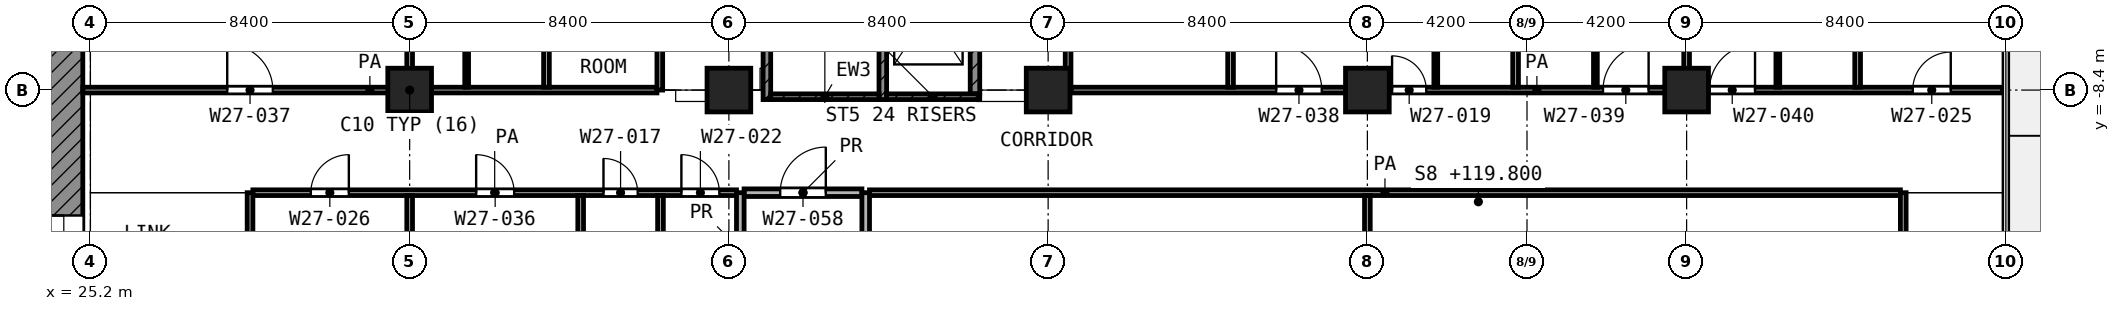
"""IFC4 building model, lengths in metres.
Left out: names, types, materials, properties, quantities, classifications, styles, units other than length and angle.
Written with IfcOpenShell. Run it as: python <this file> out.ifc"""

import sys

from ifc_helpers import new_model, si_unit, direction, frame, frame_2d, origin, origin_2d, place, context, subcontext, project, spatial, rectangle, extrude, element, fill, save


model = new_model("IFC4")
c1 = context("Model", 3, precision=1e-05, world=origin(), true_north=direction((0.0, 1.0)))
c2 = subcontext(c1, "Body", "Model", "MODEL_VIEW")
j1 = project(units=[si_unit("LENGTHUNIT", "METRE"), si_unit("PLANEANGLEUNIT", "RADIAN")], contexts=[c1])
p1 = place(None, origin())
s1 = spatial("IfcSite", under=j1, at=p1, CompositionType="ELEMENT")
p2 = place(p1, origin())
s2 = spatial("IfcBuilding", under=s1, at=p2, CompositionType="ELEMENT")
p3 = place(p2, frame((0.0, 0.0, 119.8)))
s3 = spatial("IfcBuildingStorey", under=s2, at=p3, CompositionType="ELEMENT", Elevation=119.8)
for number, where, z_axis, x_axis in (
    (1, (33.6, -8.4, 0.0), (0.0, 0.0, 1.0), (1.0, 0.0, 0.0)),
    (2, (42.0, -8.4, 0.0), (0.0, 0.0, 1.0), (1.0, 0.0, 0.0)),
    (3, (50.4, -8.4, 0.0), (0.0, 0.0, 1.0), (1.0, 0.0, 0.0)),
    (4, (58.8, -8.4, 0.0), (0.0, 0.0, 1.0), (1.0, 0.0, 0.0)),
    (5, (67.2, -8.4, 0.0), (0.0, 0.0, 1.0), (1.0, 0.0, 0.0)),
):
    element("IfcColumn", number, at=place(p3, frame(where, z_axis=z_axis, x_axis=x_axis)), inside=s3, PredefinedType="COLUMN", context=c2, shape_type="SweptSolid", body=[
        extrude(rectangle(XDim=1.15, YDim=1.15, at=origin_2d()), origin(), (0.0, 0.0, 1.0), 4.2),
    ])
p4 = place(p3, frame((24.5, -24.0, 0.0), z_axis=(0.0, 0.0, 1.0), x_axis=(0.0, 1.0, 0.0)))
e6 = element("IfcWall", 6, at=p4, inside=s3, PredefinedType="SHEAR", context=c2, shape_type="SweptSolid", body=[
    extrude(rectangle(XDim=18.6, YDim=1.0, at=frame_2d((9.3, 0.0))), origin(), (0.0, 0.0, 1.0), 3.6),
])
p5 = place(p4, frame((10.5, 0.0, 0.0)))
e7 = element("IfcOpeningElement", 7, at=p5, cuts=e6, PredefinedType="OPENING", context=c2, shape_type="SweptSolid", body=[
    extrude(rectangle(XDim=1.8, YDim=2.1, at=frame_2d((0.9, 1.05))), frame((0.0, 0.51, 0.0), z_axis=(0.0, -1.0, 0.0), x_axis=(1.0, 0.0, 0.0)), (0.0, 0.0, 1.0), 1.02),
])
p6 = place(p3, frame((43.0, -8.65, 0.0), z_axis=(0.0, 0.0, 1.0), x_axis=(0.0, 1.0, 0.0)))
e8 = element("IfcWall", 8, at=p6, inside=s3, PredefinedType="SHEAR", context=c2, shape_type="SweptSolid", body=[
    extrude(rectangle(XDim=8.35, YDim=0.2, at=frame_2d((4.175, 0.0))), origin(), (0.0, 0.0, 1.0), 3.6),
])
p7 = place(p6, frame((7.0, 0.0, 0.0)))
e9 = element("IfcOpeningElement", 9, at=p7, cuts=e8, PredefinedType="OPENING", context=c2, shape_type="SweptSolid", body=[
    extrude(rectangle(XDim=1.1, YDim=2.1, at=frame_2d((0.55, 1.05))), frame((0.0, 0.11, 0.0), z_axis=(0.0, -1.0, 0.0), x_axis=(1.0, 0.0, 0.0)), (0.0, 0.0, 1.0), 0.22),
])
p8 = place(p3, frame((46.05, -8.65, 0.0), z_axis=(0.0, 0.0, 1.0), x_axis=(0.0, 1.0, 0.0)))
e10 = element("IfcWall", 10, at=p8, inside=s3, PredefinedType="SHEAR", context=c2, shape_type="SweptSolid", body=[
    extrude(rectangle(XDim=8.35, YDim=0.2, at=frame_2d((4.175, 0.0))), origin(), (0.0, 0.0, 1.0), 3.6),
])
p9 = place(p8, frame((7.0, 0.0, 0.0)))
e11 = element("IfcOpeningElement", 11, at=p9, cuts=e10, PredefinedType="OPENING", context=c2, shape_type="SweptSolid", body=[
    extrude(rectangle(XDim=1.1, YDim=2.1, at=frame_2d((0.55, 1.05))), frame((0.0, 0.11, 0.0), z_axis=(0.0, -1.0, 0.0), x_axis=(1.0, 0.0, 0.0)), (0.0, 0.0, 1.0), 0.22),
])
p10 = place(p3, frame((43.1, -8.575, 0.0), z_axis=(0.0, 0.0, 1.0), x_axis=(1.0, 0.0, 0.0)))
e12 = element("IfcWall", 12, at=p10, inside=s3, PredefinedType="SHEAR", context=c2, shape_type="SweptSolid", body=[
    extrude(rectangle(XDim=2.85, YDim=0.15, at=frame_2d((1.425, 0.0))), origin(), (0.0, 0.0, 1.0), 3.6),
])
p11 = place(p3, frame((46.15, -8.575, 0.0), z_axis=(0.0, 0.0, 1.0), x_axis=(1.0, 0.0, 0.0)))
e13 = element("IfcWall", 13, at=p11, inside=s3, PredefinedType="SHEAR", context=c2, shape_type="SweptSolid", body=[
    extrude(rectangle(XDim=2.45, YDim=0.15, at=frame_2d((1.225, 0.0))), origin(), (0.0, 0.0, 1.0), 3.6),
])
p12 = place(p3, frame((48.475, -8.5, 0.0), z_axis=(0.0, 0.0, 1.0), x_axis=(0.0, 1.0, 0.0)))
e14 = element("IfcWall", 14, at=p12, inside=s3, PredefinedType="SHEAR", context=c2, shape_type="SweptSolid", body=[
    extrude(rectangle(XDim=3.475, YDim=0.25, at=frame_2d((1.738, 0.0))), origin(), (0.0, 0.0, 1.0), 3.6),
])
p13 = place(p3, frame((35.1, -8.325, 0.0), z_axis=(0.0, 0.0, 1.0), x_axis=(0.0, 1.0, 0.0)))
e15 = element("IfcWall", 15, at=p13, inside=s3, PredefinedType="PARTITIONING", context=c2, shape_type="SweptSolid", body=[
    extrude(rectangle(XDim=2.623, YDim=0.1, at=frame_2d((1.312, 0.0))), origin(), (0.0, 0.0, 1.0), 3.6),
])
p14 = place(p3, frame((60.6, -8.325, 0.0), z_axis=(0.0, 0.0, 1.0), x_axis=(0.0, 1.0, 0.0)))
e16 = element("IfcWall", 16, at=p14, inside=s3, PredefinedType="PARTITIONING", context=c2, shape_type="SweptSolid", body=[
    extrude(rectangle(XDim=2.624, YDim=0.1, at=frame_2d((1.312, 0.0))), origin(), (0.0, 0.0, 1.0), 3.6),
])
for number, where, z_axis, x_axis in (
    (17, (64.8, -8.325, 0.0), (0.0, 0.0, 1.0), (0.0, 1.0, 0.0)),
    (18, (69.6, -8.325, 0.0), (0.0, 0.0, 1.0), (0.0, 1.0, 0.0)),
):
    element("IfcWall", number, at=place(p3, frame(where, z_axis=z_axis, x_axis=x_axis)), inside=s3, PredefinedType="PARTITIONING", context=c2, shape_type="SweptSolid", body=[
        extrude(rectangle(XDim=2.625, YDim=0.1, at=frame_2d((1.312, 0.0))), origin(), (0.0, 0.0, 1.0), 3.6),
    ])
p15 = place(p3, frame((29.475, -11.1, 0.0), z_axis=(0.0, 0.0, 1.0), x_axis=(1.0, 0.0, 0.0)))
e19 = element("IfcWall", 19, at=p15, inside=s3, PredefinedType="PARTITIONING", context=c2, shape_type="SweptSolid", body=[
    extrude(rectangle(XDim=12.725, YDim=0.15, at=frame_2d((6.362, 0.0))), origin(), (0.0, 0.0, 1.0), 3.6),
])
p16 = place(p15, frame((1.525, 0.0, 0.0)))
e20 = element("IfcOpeningElement", 20, at=p16, cuts=e19, PredefinedType="OPENING", context=c2, shape_type="SweptSolid", body=[
    extrude(rectangle(XDim=1.0, YDim=2.1, at=frame_2d((0.5, 1.05))), frame((0.0, 0.085, 0.0), z_axis=(0.0, -1.0, 0.0), x_axis=(1.0, 0.0, 0.0)), (0.0, 0.0, 1.0), 0.17),
])
p17 = place(p15, frame((9.225, 0.0, 0.0)))
e21 = element("IfcOpeningElement", 21, at=p17, cuts=e19, PredefinedType="OPENING", context=c2, shape_type="SweptSolid", body=[
    extrude(rectangle(XDim=0.9, YDim=2.1, at=frame_2d((0.45, 1.05))), frame((0.0, 0.085, 0.0), z_axis=(0.0, -1.0, 0.0), x_axis=(1.0, 0.0, 0.0)), (0.0, 0.0, 1.0), 0.17),
])
p18 = place(p15, frame((11.275, 0.0, 0.0)))
e22 = element("IfcOpeningElement", 22, at=p18, cuts=e19, PredefinedType="OPENING", context=c2, shape_type="SweptSolid", body=[
    extrude(rectangle(XDim=1.0, YDim=2.1, at=frame_2d((0.5, 1.05))), frame((0.0, 0.085, 0.0), z_axis=(0.0, -1.0, 0.0), x_axis=(1.0, 0.0, 0.0)), (0.0, 0.0, 1.0), 0.17),
])
p19 = place(p15, frame((5.875, 0.0, 0.0)))
e23 = element("IfcOpeningElement", 23, at=p19, cuts=e19, PredefinedType="OPENING", context=c2, shape_type="SweptSolid", body=[
    extrude(rectangle(XDim=1.0, YDim=2.1, at=frame_2d((0.5, 1.05))), frame((0.0, 0.085, 0.0), z_axis=(0.0, -1.0, 0.0), x_axis=(1.0, 0.0, 0.0)), (0.0, 0.0, 1.0), 0.17),
])
p20 = place(p3, frame((45.7, -11.1, 0.0), z_axis=(0.0, 0.0, 1.0), x_axis=(1.0, 0.0, 0.0)))
e24 = element("IfcWall", 24, at=p20, inside=s3, PredefinedType="PARTITIONING", context=c2, shape_type="SweptSolid", body=[
    extrude(rectangle(XDim=27.125, YDim=0.15, at=frame_2d((13.562, 0.0))), origin(), (0.0, 0.0, 1.0), 3.6),
])
p21 = place(p3, frame((25.0, -8.4, 0.0), z_axis=(0.0, 0.0, 1.0), x_axis=(1.0, 0.0, 0.0)))
e25 = element("IfcWall", 25, at=p21, inside=s3, PredefinedType="PARTITIONING", context=c2, shape_type="SweptSolid", body=[
    extrude(rectangle(XDim=15.107, YDim=0.15, at=frame_2d((7.553, 0.0))), origin(), (0.0, 0.0, 1.0), 3.6),
])
p22 = place(p21, frame((3.8, 0.0, 0.0)))
e26 = element("IfcOpeningElement", 26, at=p22, cuts=e25, PredefinedType="OPENING", context=c2, shape_type="SweptSolid", body=[
    extrude(rectangle(XDim=1.2, YDim=2.1, at=frame_2d((0.6, 1.05))), frame((0.0, 0.085, 0.0), z_axis=(0.0, -1.0, 0.0), x_axis=(1.0, 0.0, 0.0)), (0.0, 0.0, 1.0), 0.17),
])
p23 = place(p3, frame((51.0, -8.4, 0.0), z_axis=(0.0, 0.0, 1.0), x_axis=(1.0, 0.0, 0.0)))
e27 = element("IfcWall", 27, at=p23, inside=s3, PredefinedType="PARTITIONING", context=c2, shape_type="SweptSolid", body=[
    extrude(rectangle(XDim=24.52, YDim=0.15, at=frame_2d((12.26, 0.0))), origin(), (0.0, 0.0, 1.0), 3.6),
])
p24 = place(p23, frame((5.4, 0.0, 0.0)))
e28 = element("IfcOpeningElement", 28, at=p24, cuts=e27, PredefinedType="OPENING", context=c2, shape_type="SweptSolid", body=[
    extrude(rectangle(XDim=1.2, YDim=2.1, at=frame_2d((0.6, 1.05))), frame((0.0, 0.085, 0.0), z_axis=(0.0, -1.0, 0.0), x_axis=(1.0, 0.0, 0.0)), (0.0, 0.0, 1.0), 0.17),
])
p25 = place(p23, frame((8.45, 0.0, 0.0)))
e29 = element("IfcOpeningElement", 29, at=p25, cuts=e27, PredefinedType="OPENING", context=c2, shape_type="SweptSolid", body=[
    extrude(rectangle(XDim=0.9, YDim=2.1, at=frame_2d((0.45, 1.05))), frame((0.0, 0.085, 0.0), z_axis=(0.0, -1.0, 0.0), x_axis=(1.0, 0.0, 0.0)), (0.0, 0.0, 1.0), 0.17),
])
p26 = place(p23, frame((14.0, 0.0, 0.0)))
e30 = element("IfcOpeningElement", 30, at=p26, cuts=e27, PredefinedType="OPENING", context=c2, shape_type="SweptSolid", body=[
    extrude(rectangle(XDim=1.2, YDim=2.1, at=frame_2d((0.6, 1.05))), frame((0.0, 0.085, 0.0), z_axis=(0.0, -1.0, 0.0), x_axis=(1.0, 0.0, 0.0)), (0.0, 0.0, 1.0), 0.17),
])
p27 = place(p23, frame((16.8, 0.0, 0.0)))
e31 = element("IfcOpeningElement", 31, at=p27, cuts=e27, PredefinedType="OPENING", context=c2, shape_type="SweptSolid", body=[
    extrude(rectangle(XDim=1.2, YDim=2.1, at=frame_2d((0.6, 1.05))), frame((0.0, 0.085, 0.0), z_axis=(0.0, -1.0, 0.0), x_axis=(1.0, 0.0, 0.0)), (0.0, 0.0, 1.0), 0.17),
])
p28 = place(p23, frame((22.15, 0.0, 0.0)))
e32 = element("IfcOpeningElement", 32, at=p28, cuts=e27, PredefinedType="OPENING", context=c2, shape_type="SweptSolid", body=[
    extrude(rectangle(XDim=1.0, YDim=2.1, at=frame_2d((0.5, 1.05))), frame((0.0, 0.085, 0.0), z_axis=(0.0, -1.0, 0.0), x_axis=(1.0, 0.0, 0.0)), (0.0, 0.0, 1.0), 0.17),
])
p29 = place(p3, frame((29.4, -14.1, 0.0), z_axis=(0.0, 0.0, 1.0), x_axis=(0.0, 1.0, 0.0)))
e33 = element("IfcWall", 33, at=p29, inside=s3, PredefinedType="PARTITIONING", context=c2, shape_type="SweptSolid", body=[
    extrude(rectangle(XDim=3.0, YDim=0.15, at=frame_2d((1.5, 0.0))), origin(), (0.0, 0.0, 1.0), 3.6),
])
p30 = place(p3, frame((33.6, -14.025, 0.0), z_axis=(0.0, 0.0, 1.0), x_axis=(0.0, 1.0, 0.0)))
e34 = element("IfcWall", 34, at=p30, inside=s3, PredefinedType="PARTITIONING", context=c2, shape_type="SweptSolid", body=[
    extrude(rectangle(XDim=2.85, YDim=0.15, at=frame_2d((1.425, 0.0))), origin(), (0.0, 0.0, 1.0), 3.6),
])
for number, where, z_axis, x_axis in (
    (35, (33.6, -8.325, 0.0), (0.0, 0.0, 1.0), (0.0, 1.0, 0.0)),
    (36, (37.2, -8.325, 0.0), (0.0, 0.0, 1.0), (0.0, 1.0, 0.0)),
):
    element("IfcWall", number, at=place(p3, frame(where, z_axis=z_axis, x_axis=x_axis)), inside=s3, PredefinedType="PARTITIONING", context=c2, shape_type="SweptSolid", body=[
        extrude(rectangle(XDim=8.322, YDim=0.15, at=frame_2d((4.161, 0.0))), origin(), (0.0, 0.0, 1.0), 3.6),
    ])
p31 = place(p3, frame((38.1, -14.025, 0.0), z_axis=(0.0, 0.0, 1.0), x_axis=(0.0, 1.0, 0.0)))
e37 = element("IfcWall", 37, at=p31, inside=s3, PredefinedType="PARTITIONING", context=c2, shape_type="SweptSolid", body=[
    extrude(rectangle(XDim=2.85, YDim=0.15, at=frame_2d((1.425, 0.0))), origin(), (0.0, 0.0, 1.0), 3.6),
])
p32 = place(p3, frame((40.182, -8.4, 0.0), z_axis=(0.0, 0.0, 1.0), x_axis=(0.0, 1.0, 0.0)))
e38 = element("IfcWall", 38, at=p32, inside=s3, PredefinedType="PARTITIONING", context=c2, shape_type="SweptSolid", body=[
    extrude(rectangle(XDim=8.05, YDim=0.15, at=frame_2d((4.025, 0.0))), origin(), (0.0, 0.0, 1.0), 3.6),
])
p33 = place(p32, frame((3.525, 0.0, 0.0)))
e39 = element("IfcOpeningElement", 39, at=p33, cuts=e38, PredefinedType="OPENING", context=c2, shape_type="SweptSolid", body=[
    extrude(rectangle(XDim=1.0, YDim=2.1, at=frame_2d((0.5, 1.05))), frame((0.0, 0.085, 0.0), z_axis=(0.0, -1.0, 0.0), x_axis=(1.0, 0.0, 0.0)), (0.0, 0.0, 1.0), 0.17),
])
p34 = place(p3, frame((40.2, -14.025, 0.0), z_axis=(0.0, 0.0, 1.0), x_axis=(0.0, 1.0, 0.0)))
e40 = element("IfcWall", 40, at=p34, inside=s3, PredefinedType="PARTITIONING", context=c2, shape_type="SweptSolid", body=[
    extrude(rectangle(XDim=2.85, YDim=0.15, at=frame_2d((1.425, 0.0))), origin(), (0.0, 0.0, 1.0), 3.6),
])
p35 = place(p3, frame((50.925, -8.4, 0.0), z_axis=(0.0, 0.0, 1.0), x_axis=(0.0, 1.0, 0.0)))
e41 = element("IfcWall", 41, at=p35, inside=s3, PredefinedType="PARTITIONING", context=c2, shape_type="SweptSolid", body=[
    extrude(rectangle(XDim=6.548, YDim=0.15, at=frame_2d((3.274, 0.0))), origin(), (0.0, 0.0, 1.0), 3.6),
])
p36 = place(p35, frame((2.774, 0.0, 0.0)))
e42 = element("IfcOpeningElement", 42, at=p36, cuts=e41, PredefinedType="OPENING", context=c2, shape_type="SweptSolid", body=[
    extrude(rectangle(XDim=1.0, YDim=2.1, at=frame_2d((0.5, 1.05))), frame((0.0, 0.085, 0.0), z_axis=(0.0, -1.0, 0.0), x_axis=(1.0, 0.0, 0.0)), (0.0, 0.0, 1.0), 0.17),
])
p37 = place(p3, frame((55.2, -8.325, 0.0), z_axis=(0.0, 0.0, 1.0), x_axis=(0.0, 1.0, 0.0)))
e43 = element("IfcWall", 43, at=p37, inside=s3, PredefinedType="PARTITIONING", context=c2, shape_type="SweptSolid", body=[
    extrude(rectangle(XDim=8.321, YDim=0.15, at=frame_2d((4.161, 0.0))), origin(), (0.0, 0.0, 1.0), 3.6),
])
p38 = place(p3, frame((58.8, -14.025, 0.0), z_axis=(0.0, 0.0, 1.0), x_axis=(0.0, 1.0, 0.0)))
e44 = element("IfcWall", 44, at=p38, inside=s3, PredefinedType="PARTITIONING", context=c2, shape_type="SweptSolid", body=[
    extrude(rectangle(XDim=2.85, YDim=0.15, at=frame_2d((1.425, 0.0))), origin(), (0.0, 0.0, 1.0), 3.6),
])
p39 = place(p3, frame((62.7, -8.325, 0.0), z_axis=(0.0, 0.0, 1.0), x_axis=(0.0, 1.0, 0.0)))
e45 = element("IfcWall", 45, at=p39, inside=s3, PredefinedType="PARTITIONING", context=c2, shape_type="SweptSolid", body=[
    extrude(rectangle(XDim=8.324, YDim=0.15, at=frame_2d((4.162, 0.0))), origin(), (0.0, 0.0, 1.0), 3.6),
])
p40 = place(p3, frame((67.2, -8.325, 0.0), z_axis=(0.0, 0.0, 1.0), x_axis=(0.0, 1.0, 0.0)))
e46 = element("IfcWall", 46, at=p40, inside=s3, PredefinedType="PARTITIONING", context=c2, shape_type="SweptSolid", body=[
    extrude(rectangle(XDim=8.325, YDim=0.15, at=frame_2d((4.163, 0.0))), origin(), (0.0, 0.0, 1.0), 3.6),
])
p41 = place(p3, frame((71.7, -8.325, 0.0), z_axis=(0.0, 0.0, 1.0), x_axis=(0.0, 1.0, 0.0)))
e47 = element("IfcWall", 47, at=p41, inside=s3, PredefinedType="PARTITIONING", context=c2, shape_type="SweptSolid", body=[
    extrude(rectangle(XDim=8.322, YDim=0.15, at=frame_2d((4.161, 0.0))), origin(), (0.0, 0.0, 1.0), 3.6),
])
p42 = place(p3, frame((72.9, -14.1, 0.0), z_axis=(0.0, 0.0, 1.0), x_axis=(0.0, 1.0, 0.0)))
e48 = element("IfcWall", 48, at=p42, inside=s3, PredefinedType="PARTITIONING", context=c2, shape_type="SweptSolid", body=[
    extrude(rectangle(XDim=3.0, YDim=0.15, at=frame_2d((1.5, 0.0))), origin(), (0.0, 0.0, 1.0), 3.6),
])
p43 = place(p3, frame((42.4, -11.1, 0.0), z_axis=(0.0, 0.0, 1.0), x_axis=(1.0, 0.0, 0.0)))
e49 = element("IfcWall", 49, at=p43, inside=s3, PredefinedType="PARTITIONING", context=c2, shape_type="SweptSolid", body=[
    extrude(rectangle(XDim=3.1, YDim=0.2, at=frame_2d((1.55, 0.0))), origin(), (0.0, 0.0, 1.0), 3.6),
])
p44 = place(p43, frame((0.95, 0.0, 0.0)))
e50 = element("IfcOpeningElement", 50, at=p44, cuts=e49, PredefinedType="OPENING", context=c2, shape_type="SweptSolid", body=[
    extrude(rectangle(XDim=1.2, YDim=2.1, at=frame_2d((0.6, 1.05))), frame((0.0, 0.11, 0.0), z_axis=(0.0, -1.0, 0.0), x_axis=(1.0, 0.0, 0.0)), (0.0, 0.0, 1.0), 0.22),
])
for number, where, z_axis, x_axis in (
    (51, (42.3, -14.1, 0.0), (0.0, 0.0, 1.0), (0.0, 1.0, 0.0)),
    (52, (45.6, -14.1, 0.0), (0.0, 0.0, 1.0), (0.0, 1.0, 0.0)),
):
    element("IfcWall", number, at=place(p3, frame(where, z_axis=z_axis, x_axis=x_axis)), inside=s3, PredefinedType="PARTITIONING", context=c2, shape_type="SweptSolid", body=[
        extrude(rectangle(XDim=3.0, YDim=0.2, at=frame_2d((1.5, 0.0))), origin(), (0.0, 0.0, 1.0), 3.6),
    ])
p45 = place(p5, origin())
e53 = element("IfcDoor", 53, at=p45, inside=s3, OperationType="DOUBLE_DOOR_SINGLE_SWING", PredefinedType="DOOR", context=c2, shape_type="SweptSolid", body=[
    extrude(rectangle(XDim=1.8, YDim=2.1, at=frame_2d((0.9, 1.05))), frame((0.0, 0.025, 0.0), z_axis=(0.0, -1.0, 0.0), x_axis=(1.0, 0.0, 0.0)), (0.0, 0.0, 1.0), 0.05),
])
fill(e7, e53)
p46 = place(p22, origin())
e54 = element("IfcDoor", 54, at=p46, inside=s3, OperationType="SINGLE_SWING_LEFT", PredefinedType="DOOR", context=c2, shape_type="SweptSolid", body=[
    extrude(rectangle(XDim=1.2, YDim=2.1, at=frame_2d((0.6, 1.05))), frame((0.0, 0.025, 0.0), z_axis=(0.0, -1.0, 0.0), x_axis=(1.0, 0.0, 0.0)), (0.0, 0.0, 1.0), 0.05),
])
fill(e26, e54)
p47 = place(p24, origin())
e55 = element("IfcDoor", 55, at=p47, inside=s3, OperationType="SINGLE_SWING_LEFT", PredefinedType="DOOR", context=c2, shape_type="SweptSolid", body=[
    extrude(rectangle(XDim=1.2, YDim=2.1, at=frame_2d((0.6, 1.05))), frame((0.0, 0.025, 0.0), z_axis=(0.0, -1.0, 0.0), x_axis=(1.0, 0.0, 0.0)), (0.0, 0.0, 1.0), 0.05),
])
fill(e28, e55)
p48 = place(p25, origin())
e56 = element("IfcDoor", 56, at=p48, inside=s3, OperationType="SINGLE_SWING_LEFT", PredefinedType="DOOR", context=c2, shape_type="SweptSolid", body=[
    extrude(rectangle(XDim=0.9, YDim=2.1, at=frame_2d((0.45, 1.05))), frame((0.0, 0.025, 0.0), z_axis=(0.0, -1.0, 0.0), x_axis=(1.0, 0.0, 0.0)), (0.0, 0.0, 1.0), 0.05),
])
fill(e29, e56)
p49 = place(p26, origin())
e57 = element("IfcDoor", 57, at=p49, inside=s3, OperationType="SINGLE_SWING_RIGHT", PredefinedType="DOOR", context=c2, shape_type="SweptSolid", body=[
    extrude(rectangle(XDim=1.2, YDim=2.1, at=frame_2d((0.6, 1.05))), frame((0.0, 0.025, 0.0), z_axis=(0.0, -1.0, 0.0), x_axis=(1.0, 0.0, 0.0)), (0.0, 0.0, 1.0), 0.05),
])
fill(e30, e57)
p50 = place(p27, origin())
e58 = element("IfcDoor", 58, at=p50, inside=s3, OperationType="SINGLE_SWING_RIGHT", PredefinedType="DOOR", context=c2, shape_type="SweptSolid", body=[
    extrude(rectangle(XDim=1.2, YDim=2.1, at=frame_2d((0.6, 1.05))), frame((0.0, 0.025, 0.0), z_axis=(0.0, -1.0, 0.0), x_axis=(1.0, 0.0, 0.0)), (0.0, 0.0, 1.0), 0.05),
])
fill(e31, e58)
p51 = place(p28, origin())
e59 = element("IfcDoor", 59, at=p51, inside=s3, OperationType="SINGLE_SWING_RIGHT", PredefinedType="DOOR", context=c2, shape_type="SweptSolid", body=[
    extrude(rectangle(XDim=1.0, YDim=2.1, at=frame_2d((0.5, 1.05))), frame((0.0, 0.025, 0.0), z_axis=(0.0, -1.0, 0.0), x_axis=(1.0, 0.0, 0.0)), (0.0, 0.0, 1.0), 0.05),
])
fill(e32, e59)
p52 = place(p16, origin())
e60 = element("IfcDoor", 60, at=p52, inside=s3, OperationType="SINGLE_SWING_RIGHT", PredefinedType="DOOR", context=c2, shape_type="SweptSolid", body=[
    extrude(rectangle(XDim=1.0, YDim=2.1, at=frame_2d((0.5, 1.05))), frame((0.0, 0.025, 0.0), z_axis=(0.0, -1.0, 0.0), x_axis=(1.0, 0.0, 0.0)), (0.0, 0.0, 1.0), 0.05),
])
fill(e20, e60)
p53 = place(p17, origin())
e61 = element("IfcDoor", 61, at=p53, inside=s3, OperationType="SINGLE_SWING_LEFT", PredefinedType="DOOR", context=c2, shape_type="SweptSolid", body=[
    extrude(rectangle(XDim=0.9, YDim=2.1, at=frame_2d((0.45, 1.05))), frame((0.0, 0.025, 0.0), z_axis=(0.0, -1.0, 0.0), x_axis=(1.0, 0.0, 0.0)), (0.0, 0.0, 1.0), 0.05),
])
fill(e21, e61)
p54 = place(p18, origin())
e62 = element("IfcDoor", 62, at=p54, inside=s3, OperationType="SINGLE_SWING_LEFT", PredefinedType="DOOR", context=c2, shape_type="SweptSolid", body=[
    extrude(rectangle(XDim=1.0, YDim=2.1, at=frame_2d((0.5, 1.05))), frame((0.0, 0.025, 0.0), z_axis=(0.0, -1.0, 0.0), x_axis=(1.0, 0.0, 0.0)), (0.0, 0.0, 1.0), 0.05),
])
fill(e22, e62)
p55 = place(p44, origin())
e63 = element("IfcDoor", 63, at=p55, inside=s3, OperationType="SINGLE_SWING_RIGHT", PredefinedType="DOOR", context=c2, shape_type="SweptSolid", body=[
    extrude(rectangle(XDim=1.2, YDim=2.1, at=frame_2d((0.6, 1.05))), frame((0.0, 0.025, 0.0), z_axis=(0.0, -1.0, 0.0), x_axis=(1.0, 0.0, 0.0)), (0.0, 0.0, 1.0), 0.05),
])
fill(e50, e63)
p56 = place(p19, origin())
e64 = element("IfcDoor", 64, at=p56, inside=s3, OperationType="SINGLE_SWING_LEFT", PredefinedType="DOOR", context=c2, shape_type="SweptSolid", body=[
    extrude(rectangle(XDim=1.0, YDim=2.1, at=frame_2d((0.5, 1.05))), frame((0.0, 0.025, 0.0), z_axis=(0.0, -1.0, 0.0), x_axis=(1.0, 0.0, 0.0)), (0.0, 0.0, 1.0), 0.05),
])
fill(e23, e64)
save(model, sys.argv[1])
